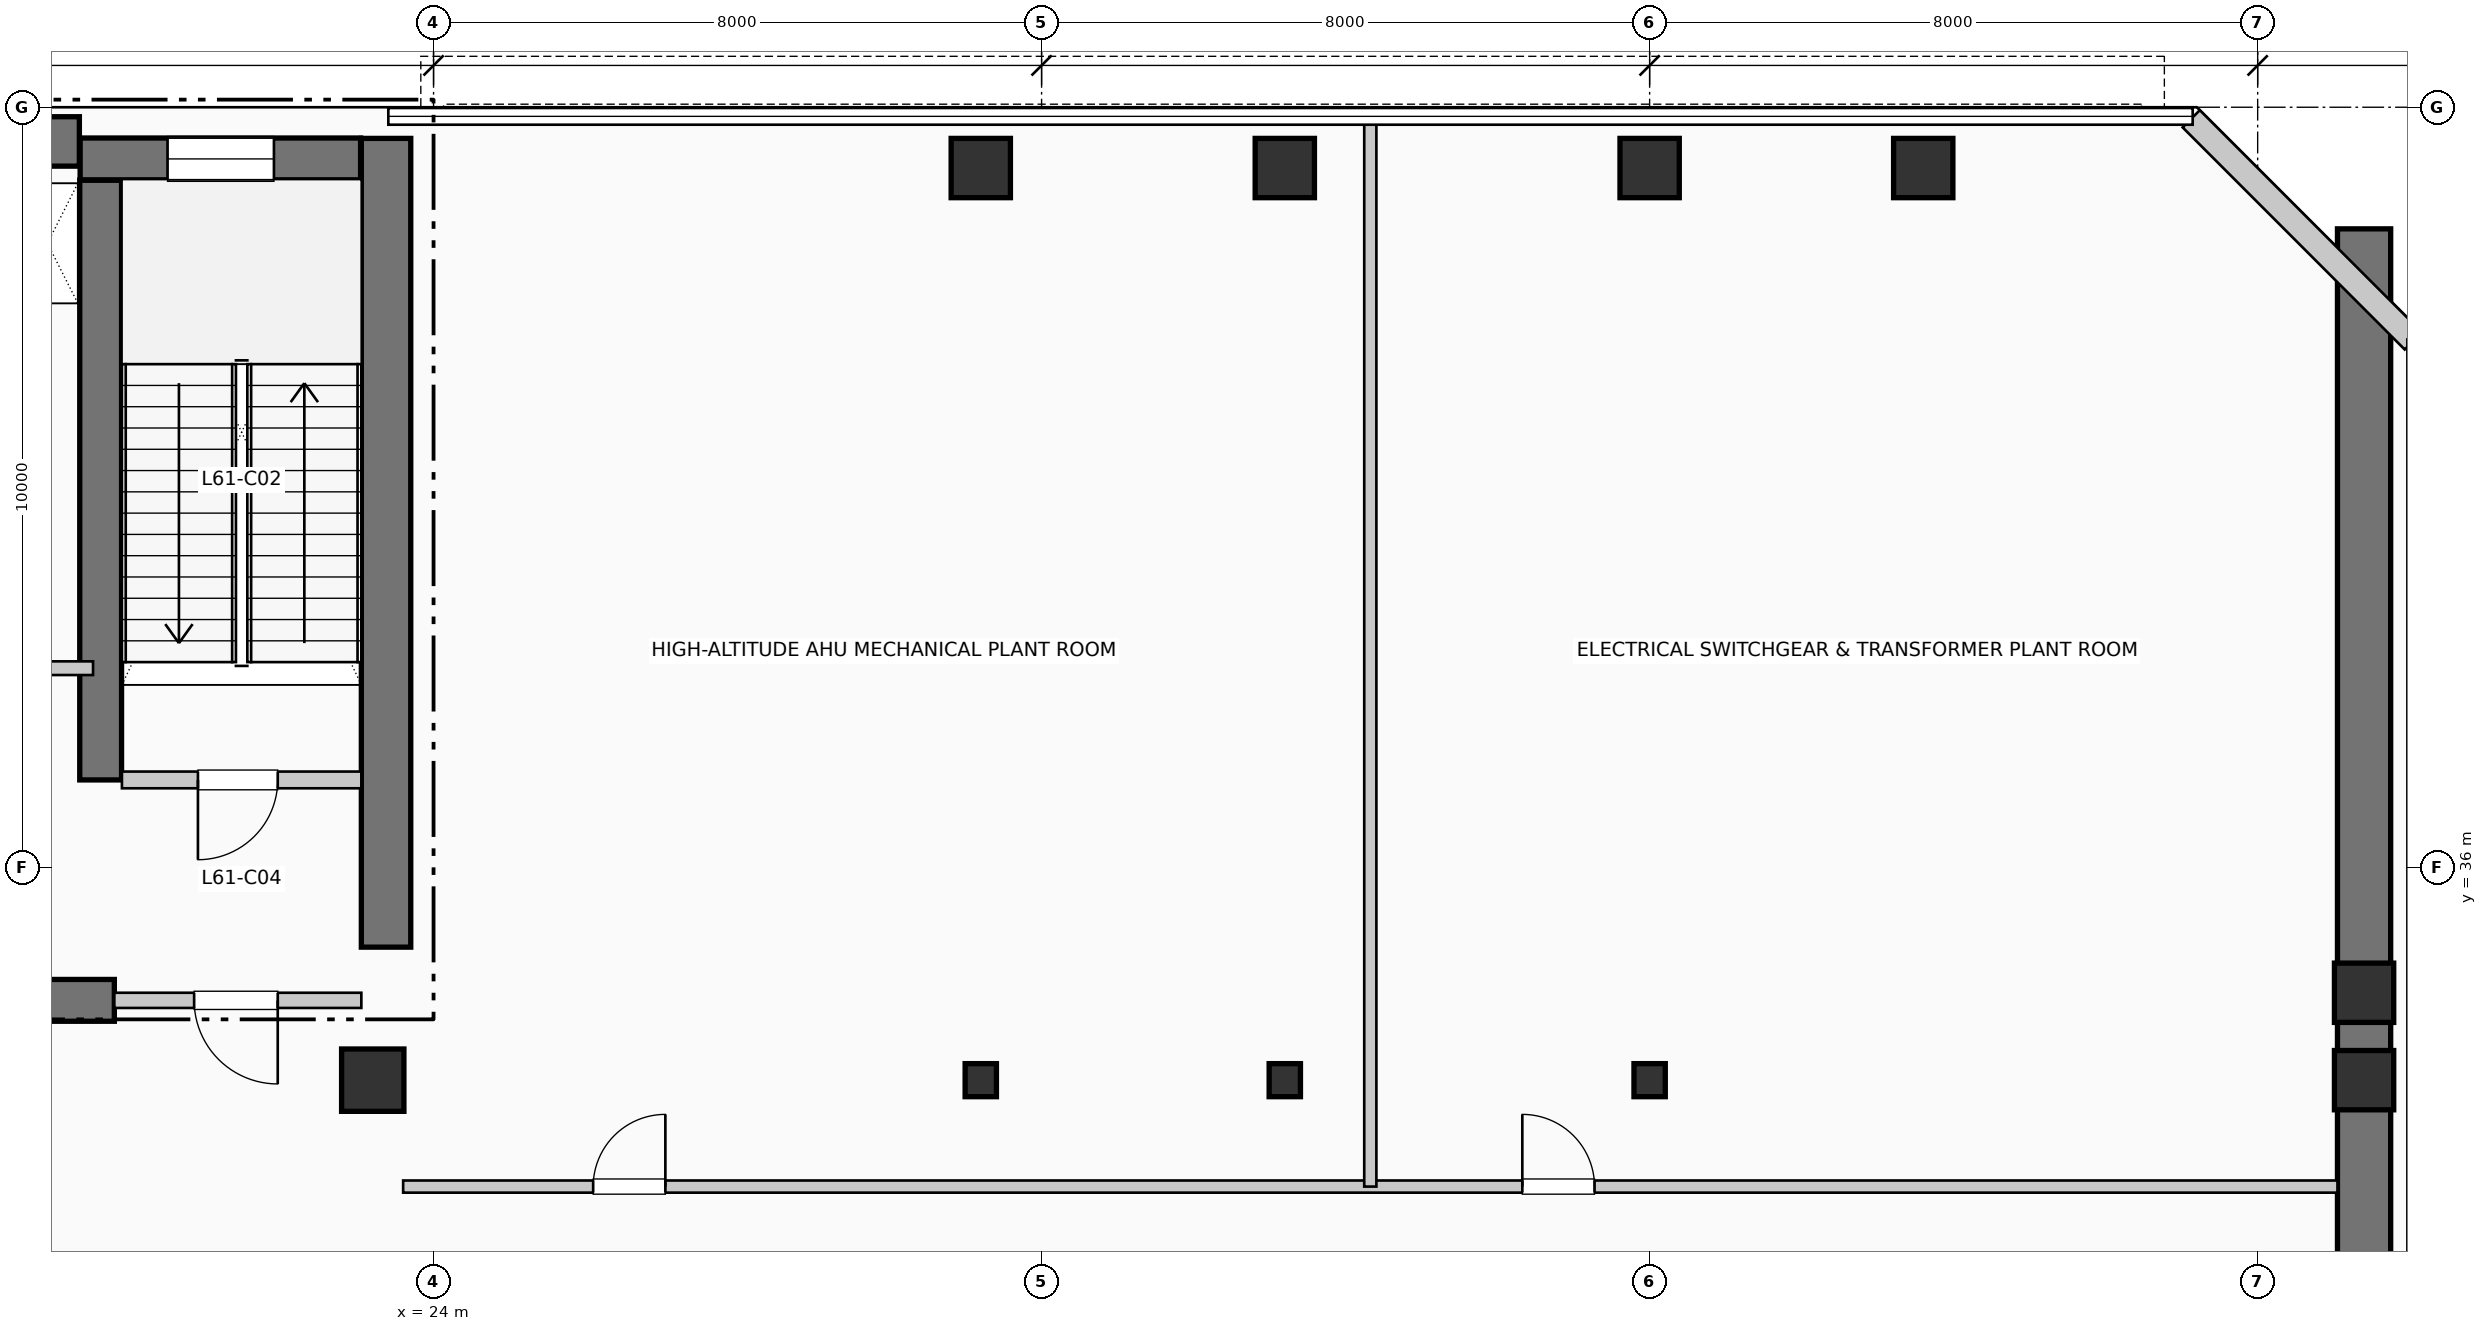
"""IFC4 building model, lengths in metres.
Left out: names, types, materials, properties, quantities, classifications, styles, units other than length and angle.
Written with IfcOpenShell. Run it as: python <this file> out.ifc"""

import sys

from ifc_helpers import new_model, si_unit, direction, frame, frame_2d, origin, origin_2d, place, context, subcontext, project, spatial, rectangle, i_section, extrude, element, fill, save


model = new_model("IFC4")
c1 = context("Model", 3, precision=1e-05, world=origin(), true_north=direction((0.0, 1.0)))
c2 = subcontext(c1, "Body", "Model", "MODEL_VIEW")
j1 = project(units=[si_unit("LENGTHUNIT", "METRE"), si_unit("PLANEANGLEUNIT", "RADIAN")], contexts=[c1])
p1 = place(None, origin())
s1 = spatial("IfcSite", under=j1, at=p1, CompositionType="ELEMENT")
p2 = place(p1, origin())
s2 = spatial("IfcBuilding", under=s1, at=p2, CompositionType="ELEMENT")
p3 = place(p2, frame((0.0, 0.0, 251.46)))
s3 = spatial("IfcBuildingStorey", under=s2, at=p3, CompositionType="ELEMENT", Elevation=251.46)
p4 = place(p3, frame((5.36, 45.55, 0.0), z_axis=(0.0, 0.0, 1.0), x_axis=(1.0, 0.0, 0.0)))
e1 = element("IfcWall", 1, at=p4, inside=s3, PredefinedType="SHEAR", context=c2, shape_type="SweptSolid", body=[
    extrude(rectangle(XDim=13.98, YDim=0.65, at=frame_2d((6.99, 0.0))), origin(), (0.0, 0.0, 1.0), 4.95),
])
p5 = place(p3, frame((23.375, 34.95, 0.0), z_axis=(0.0, 0.0, 1.0), x_axis=(0.0, 1.0, 0.0)))
e2 = element("IfcWall", 2, at=p5, inside=s3, PredefinedType="SHEAR", context=c2, shape_type="SweptSolid", body=[
    extrude(rectangle(XDim=10.64, YDim=0.65, at=frame_2d((5.32, 0.0))), origin(), (0.0, 0.0, 1.0), 4.95),
])
p6 = place(p3, frame((13.68, 34.25, 0.0), z_axis=(0.0, 0.0, 1.0), x_axis=(1.0, 0.0, 0.0)))
e3 = element("IfcWall", 3, at=p6, inside=s3, PredefinedType="SHEAR", context=c2, shape_type="SweptSolid", body=[
    extrude(rectangle(XDim=6.12, YDim=0.55, at=frame_2d((3.06, 0.0))), origin(), (0.0, 0.0, 1.0), 4.95),
])
p7 = place(p3, frame((19.62, 37.15, 0.0), z_axis=(0.0, 0.0, 1.0), x_axis=(0.0, 1.0, 0.0)))
e4 = element("IfcWall", 4, at=p7, inside=s3, PredefinedType="SHEAR", context=c2, shape_type="SweptSolid", body=[
    extrude(rectangle(XDim=7.89, YDim=0.55, at=frame_2d((3.945, 0.0))), origin(), (0.0, 0.0, 1.0), 4.95),
])
p8 = place(p3, frame((19.35, 45.32, 0.0), z_axis=(0.0, 0.0, 1.0), x_axis=(1.0, 0.0, 0.0)))
e5 = element("IfcWall", 5, at=p8, inside=s3, PredefinedType="SHEAR", context=c2, shape_type="SweptSolid", body=[
    extrude(rectangle(XDim=3.69, YDim=0.55, at=frame_2d((1.845, 0.0))), origin(), (0.0, 0.0, 1.0), 4.95),
])
p9 = place(p8, frame((1.15, 0.0, 1.05)))
e6 = element("IfcOpeningElement", 6, at=p9, cuts=e5, PredefinedType="OPENING", context=c2, shape_type="SweptSolid", body=[
    extrude(rectangle(XDim=1.4, YDim=1.8, at=frame_2d((0.7, 0.9))), frame((0.0, 0.285, 0.0), z_axis=(0.0, -1.0, 0.0), x_axis=(1.0, 0.0, 0.0)), (0.0, 0.0, 1.0), 0.57),
])
p10 = place(p3, frame((49.4, 23.5, 0.0), z_axis=(0.0, 0.0, 1.0), x_axis=(0.0, 1.0, 0.0)))
e7 = element("IfcWall", 7, at=p10, inside=s3, PredefinedType="SHEAR", context=c2, shape_type="SweptSolid", body=[
    extrude(rectangle(XDim=20.9, YDim=0.7, at=frame_2d((10.45, 0.0))), origin(), (0.0, 0.0, 1.0), 4.3),
])
p11 = place(p3, frame((23.2, 33.2, 0.0), z_axis=(0.0, 0.0, 1.0), x_axis=(1.0, 0.0, 0.0)))
e8 = element("IfcColumn", 8, at=p11, inside=s3, PredefinedType="COLUMN", context=c2, shape_type="SweptSolid", body=[
    extrude(rectangle(XDim=0.82, YDim=0.82, at=origin_2d()), origin(), (0.0, 0.0, 1.0), 4.95),
])
p12 = place(p3, frame((31.2, 33.2, 0.0), z_axis=(0.0, 0.0, 1.0), x_axis=(1.0, 0.0, 0.0)))
e9 = element("IfcColumn", 9, at=p12, inside=s3, PredefinedType="COLUMN", context=c2, shape_type="SweptSolid", body=[
    extrude(i_section(OverallWidth=0.412, OverallDepth=0.435, WebThickness=0.027, FlangeThickness=0.043, at=origin_2d()), origin(), (0.0, 0.0, 1.0), 4.95),
])
p13 = place(p3, frame((31.2, 45.2, 0.0), z_axis=(0.0, 0.0, 1.0), x_axis=(1.0, 0.0, 0.0)))
e10 = element("IfcColumn", 10, at=p13, inside=s3, PredefinedType="COLUMN", context=c2, shape_type="SweptSolid", body=[
    extrude(rectangle(XDim=0.78, YDim=0.78, at=origin_2d()), origin(), (0.0, 0.0, 1.0), 4.95),
])
p14 = place(p3, frame((35.2, 33.2, 0.0), z_axis=(0.0, 0.0, 1.0), x_axis=(1.0, 0.0, 0.0)))
e11 = element("IfcColumn", 11, at=p14, inside=s3, PredefinedType="COLUMN", context=c2, shape_type="SweptSolid", body=[
    extrude(i_section(OverallWidth=0.412, OverallDepth=0.435, WebThickness=0.027, FlangeThickness=0.043, at=origin_2d()), origin(), (0.0, 0.0, 1.0), 4.95),
])
p15 = place(p3, frame((35.2, 45.2, 0.0), z_axis=(0.0, 0.0, 1.0), x_axis=(1.0, 0.0, 0.0)))
e12 = element("IfcColumn", 12, at=p15, inside=s3, PredefinedType="COLUMN", context=c2, shape_type="SweptSolid", body=[
    extrude(rectangle(XDim=0.78, YDim=0.78, at=origin_2d()), origin(), (0.0, 0.0, 1.0), 4.95),
])
p16 = place(p3, frame((40.0, 33.2, 0.0), z_axis=(0.0, 0.0, 1.0), x_axis=(1.0, 0.0, 0.0)))
e13 = element("IfcColumn", 13, at=p16, inside=s3, PredefinedType="COLUMN", context=c2, shape_type="SweptSolid", body=[
    extrude(i_section(OverallWidth=0.412, OverallDepth=0.435, WebThickness=0.027, FlangeThickness=0.043, at=origin_2d()), origin(), (0.0, 0.0, 1.0), 4.95),
])
for number, where, z_axis, x_axis in (
    (14, (40.0, 45.2, 0.0), (0.0, 0.0, 1.0), (1.0, 0.0, 0.0)),
    (15, (43.6, 45.2, 0.0), (0.0, 0.0, 1.0), (1.0, 0.0, 0.0)),
    (16, (49.4, 33.2, 0.0), (0.0, 0.0, 1.0), (1.0, 0.0, 0.0)),
    (17, (49.4, 34.35, 0.0), (0.0, 0.0, 1.0), (1.0, 0.0, 0.0)),
):
    element("IfcColumn", number, at=place(p3, frame(where, z_axis=z_axis, x_axis=x_axis)), inside=s3, PredefinedType="COLUMN", context=c2, shape_type="SweptSolid", body=[
        extrude(rectangle(XDim=0.78, YDim=0.78, at=origin_2d()), origin(), (0.0, 0.0, 1.0), 4.95),
    ])
p17 = place(p3, frame((50.048, 42.926, 0.0), z_axis=(0.0, 0.0, 1.0), x_axis=(-0.707136318428, 0.707077242712, 0.0)))
e18 = element("IfcWall", 18, at=p17, inside=s3, PredefinedType="SOLIDWALL", context=c2, shape_type="SweptSolid", body=[
    extrude(rectangle(XDim=4.133, YDim=0.32, at=frame_2d((2.066, 0.0))), origin(), (0.0, 0.0, 1.0), 4.7),
])
p18 = place(p3, frame((19.9, 37.15, 0.0), z_axis=(0.0, 0.0, 1.0), x_axis=(1.0, 0.0, 0.0)))
e19 = element("IfcWall", 19, at=p18, inside=s3, PredefinedType="PARTITIONING", context=c2, shape_type="SweptSolid", body=[
    extrude(rectangle(XDim=3.15, YDim=0.22, at=frame_2d((1.575, 0.0))), origin(), (0.0, 0.0, 1.0), 4.7),
])
p19 = place(p18, frame((2.05, 0.0, 0.0), z_axis=(0.0, 0.0, 1.0), x_axis=(-1.0, 0.0, 0.0)))
e20 = element("IfcOpeningElement", 20, at=p19, cuts=e19, PredefinedType="OPENING", context=c2, shape_type="SweptSolid", body=[
    extrude(rectangle(XDim=1.05, YDim=2.15, at=frame_2d((0.525, 1.075))), frame((0.0, 0.12, 0.0), z_axis=(0.0, -1.0, 0.0), x_axis=(1.0, 0.0, 0.0)), (0.0, 0.0, 1.0), 0.24),
])
p20 = place(p3, frame((19.8, 34.25, 0.0), z_axis=(0.0, 0.0, 1.0), x_axis=(1.0, 0.0, 0.0)))
e21 = element("IfcWall", 21, at=p20, inside=s3, PredefinedType="PARTITIONING", context=c2, shape_type="SweptSolid", body=[
    extrude(rectangle(XDim=3.25, YDim=0.2, at=frame_2d((1.625, 0.0))), origin(), (0.0, 0.0, 1.0), 4.7),
])
p21 = place(p20, frame((2.15, 0.0, 0.0), z_axis=(0.0, 0.0, 1.0), x_axis=(-1.0, 0.0, 0.0)))
e22 = element("IfcOpeningElement", 22, at=p21, cuts=e21, PredefinedType="OPENING", context=c2, shape_type="SweptSolid", body=[
    extrude(rectangle(XDim=1.1, YDim=2.15, at=frame_2d((0.55, 1.075))), frame((0.0, 0.11, 0.0), z_axis=(0.0, -1.0, 0.0), x_axis=(1.0, 0.0, 0.0)), (0.0, 0.0, 1.0), 0.22),
])
p22 = place(p3, frame((17.68, 38.62, 0.0), z_axis=(0.0, 0.0, 1.0), x_axis=(1.0, 0.0, 0.0)))
e23 = element("IfcWall", 23, at=p22, inside=s3, PredefinedType="PARTITIONING", context=c2, shape_type="SweptSolid", body=[
    extrude(rectangle(XDim=1.84, YDim=0.18, at=frame_2d((0.92, 0.0))), origin(), (0.0, 0.0, 1.0), 4.7),
])
p23 = place(p22, frame((0.24, 0.0, 0.0)))
e24 = element("IfcOpeningElement", 24, at=p23, cuts=e23, PredefinedType="OPENING", context=c2, shape_type="SweptSolid", body=[
    extrude(rectangle(XDim=0.92, YDim=2.1, at=frame_2d((0.46, 1.05))), frame((0.0, 0.1, 0.0), z_axis=(0.0, -1.0, 0.0), x_axis=(1.0, 0.0, 0.0)), (0.0, 0.0, 1.0), 0.2),
])
p24 = place(p3, frame((23.6, 31.8, 0.0), z_axis=(0.0, 0.0, 1.0), x_axis=(1.0, 0.0, 0.0)))
e25 = element("IfcWall", 25, at=p24, inside=s3, PredefinedType="PARTITIONING", context=c2, shape_type="SweptSolid", body=[
    extrude(rectangle(XDim=25.45, YDim=0.16, at=frame_2d((12.725, 0.0))), origin(), (0.0, 0.0, 1.0), 4.7),
])
p25 = place(p24, frame((2.5, 0.0, 0.0)))
e26 = element("IfcOpeningElement", 26, at=p25, cuts=e25, PredefinedType="OPENING", context=c2, shape_type="SweptSolid", body=[
    extrude(rectangle(XDim=0.95, YDim=2.1, at=frame_2d((0.475, 1.05))), frame((0.0, 0.09, 0.0), z_axis=(0.0, -1.0, 0.0), x_axis=(1.0, 0.0, 0.0)), (0.0, 0.0, 1.0), 0.18),
])
p26 = place(p24, frame((14.725, 0.0, 0.0)))
e27 = element("IfcOpeningElement", 27, at=p26, cuts=e25, PredefinedType="OPENING", context=c2, shape_type="SweptSolid", body=[
    extrude(rectangle(XDim=0.95, YDim=2.1, at=frame_2d((0.475, 1.05))), frame((0.0, 0.09, 0.0), z_axis=(0.0, -1.0, 0.0), x_axis=(1.0, 0.0, 0.0)), (0.0, 0.0, 1.0), 0.18),
])
p27 = place(p3, frame((36.325, 31.8, 0.0), z_axis=(0.0, 0.0, 1.0), x_axis=(0.0, 1.0, 0.0)))
e28 = element("IfcWall", 28, at=p27, inside=s3, PredefinedType="PARTITIONING", context=c2, shape_type="SweptSolid", body=[
    extrude(rectangle(XDim=14.01, YDim=0.16, at=frame_2d((7.005, 0.0))), origin(), (0.0, 0.0, 1.0), 4.7),
])
p28 = place(p9, origin())
e29 = element("IfcWindow", 29, at=p28, inside=s3, PartitioningType="SINGLE_PANEL", PredefinedType="WINDOW", context=c2, shape_type="SweptSolid", body=[
    extrude(rectangle(XDim=1.4, YDim=1.8, at=frame_2d((0.7, 0.9))), frame((0.0, 0.03, 0.0), z_axis=(0.0, -1.0, 0.0), x_axis=(1.0, 0.0, 0.0)), (0.0, 0.0, 1.0), 0.06),
])
fill(e6, e29)
p29 = place(p19, origin())
e30 = element("IfcDoor", 30, at=p29, inside=s3, OperationType="SINGLE_SWING_LEFT", PredefinedType="DOOR", context=c2, shape_type="SweptSolid", body=[
    extrude(rectangle(XDim=1.05, YDim=2.15, at=frame_2d((0.525, 1.075))), frame((0.0, 0.025, 0.0), z_axis=(0.0, -1.0, 0.0), x_axis=(1.0, 0.0, 0.0)), (0.0, 0.0, 1.0), 0.05),
])
fill(e20, e30)
p30 = place(p21, origin())
e31 = element("IfcDoor", 31, at=p30, inside=s3, OperationType="SINGLE_SWING_RIGHT", PredefinedType="DOOR", context=c2, shape_type="SweptSolid", body=[
    extrude(rectangle(XDim=1.1, YDim=2.15, at=frame_2d((0.55, 1.075))), frame((0.0, 0.025, 0.0), z_axis=(0.0, -1.0, 0.0), x_axis=(1.0, 0.0, 0.0)), (0.0, 0.0, 1.0), 0.05),
])
fill(e22, e31)
p31 = place(p25, origin())
e32 = element("IfcDoor", 32, at=p31, inside=s3, OperationType="SINGLE_SWING_RIGHT", PredefinedType="DOOR", context=c2, shape_type="SweptSolid", body=[
    extrude(rectangle(XDim=0.95, YDim=2.1, at=frame_2d((0.475, 1.05))), frame((0.0, 0.025, 0.0), z_axis=(0.0, -1.0, 0.0), x_axis=(1.0, 0.0, 0.0)), (0.0, 0.0, 1.0), 0.05),
])
fill(e26, e32)
p32 = place(p26, origin())
e33 = element("IfcDoor", 33, at=p32, inside=s3, OperationType="SINGLE_SWING_LEFT", PredefinedType="DOOR", context=c2, shape_type="SweptSolid", body=[
    extrude(rectangle(XDim=0.95, YDim=2.1, at=frame_2d((0.475, 1.05))), frame((0.0, 0.025, 0.0), z_axis=(0.0, -1.0, 0.0), x_axis=(1.0, 0.0, 0.0)), (0.0, 0.0, 1.0), 0.05),
])
fill(e27, e33)
save(model, sys.argv[1])
